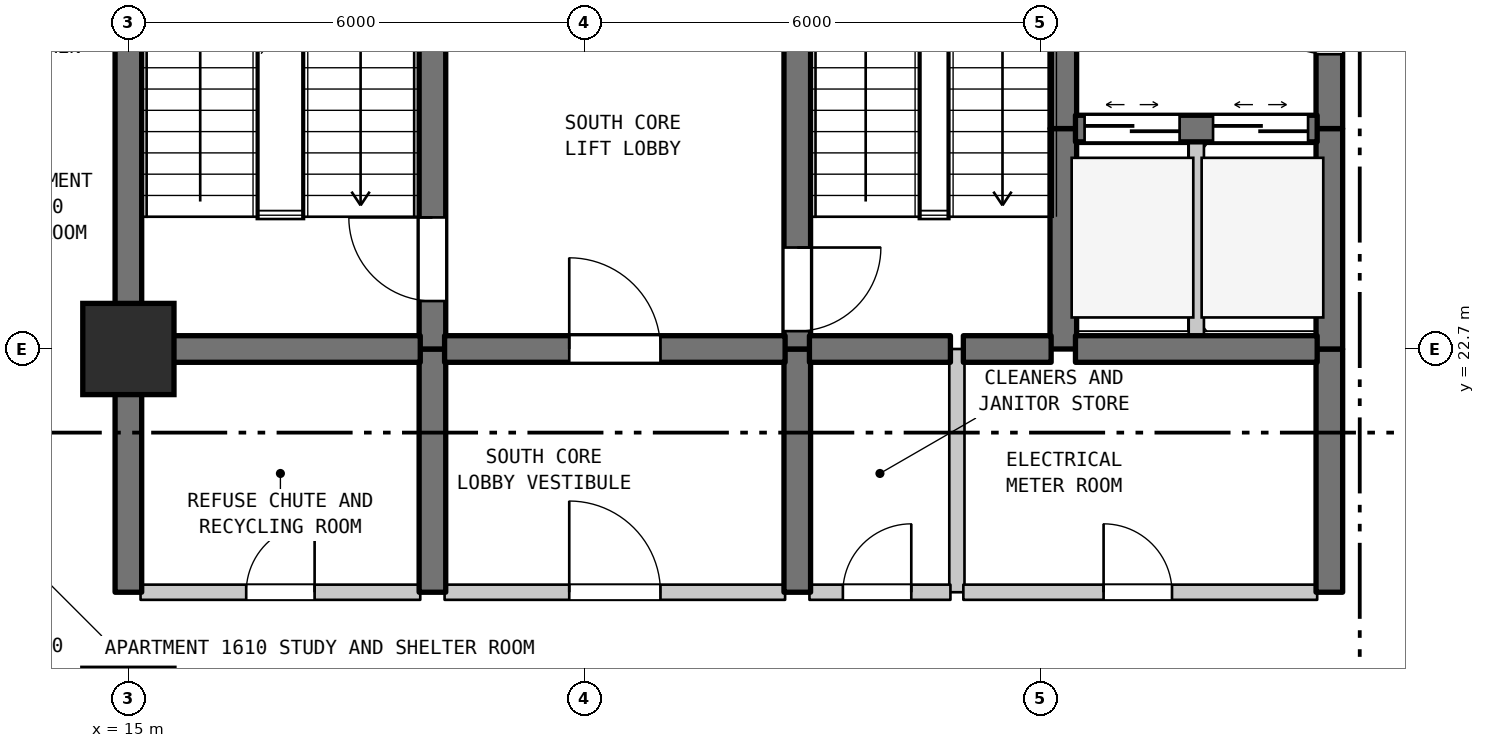
"""IFC4 building model, lengths in metres.
Left out: names, types, materials, properties, quantities, classifications, styles, units other than length and angle.
Written with IfcOpenShell. Run it as: python <this file> out.ifc"""

import sys

from ifc_helpers import new_model, si_unit, direction, frame, frame_2d, origin, origin_2d, place, context, subcontext, project, spatial, rectangle, extrude, element, fill, save


model = new_model("IFC4")
c1 = context("Model", 3, precision=1e-05, world=origin(), true_north=direction((0.0, 1.0)))
c2 = subcontext(c1, "Body", "Model", "MODEL_VIEW")
j1 = project(units=[si_unit("LENGTHUNIT", "METRE"), si_unit("PLANEANGLEUNIT", "RADIAN")], contexts=[c1])
p1 = place(None, origin())
s1 = spatial("IfcSite", under=j1, at=p1, CompositionType="ELEMENT")
p2 = place(p1, origin())
s2 = spatial("IfcBuilding", under=s1, at=p2, CompositionType="ELEMENT")
p3 = place(p2, frame((0.0, 0.0, 70.1)))
s3 = spatial("IfcBuildingStorey", under=s2, at=p3, CompositionType="ELEMENT", Elevation=70.1)
p4 = place(p3, frame((15.0, 22.7, 0.0), z_axis=(0.0, 0.0, 1.0), x_axis=(1.0, 0.0, 0.0)))
e1 = element("IfcColumn", 1, at=p4, inside=s3, PredefinedType="COLUMN", context=c2, shape_type="SweptSolid", body=[
    extrude(rectangle(XDim=1.2, YDim=1.2, at=origin_2d()), origin(), (0.0, 0.0, 1.0), 3.7),
])
p5 = place(p3, frame((15.0, 19.5, 0.0), z_axis=(0.0, 0.0, 1.0), x_axis=(0.0, 1.0, 0.0)))
e2 = element("IfcWall", 2, at=p5, inside=s3, PredefinedType="SHEAR", context=c2, shape_type="SweptSolid", body=[
    extrude(rectangle(XDim=3.2, YDim=0.35, at=frame_2d((1.6, 0.0))), origin(), (0.0, 0.0, 1.0), 3.385),
])
p6 = place(p3, frame((15.0, 22.7, 0.0), z_axis=(0.0, 0.0, 1.0), x_axis=(0.0, 1.0, 0.0)))
e3 = element("IfcWall", 3, at=p6, inside=s3, PredefinedType="SHEAR", context=c2, shape_type="SweptSolid", body=[
    extrude(rectangle(XDim=6.8, YDim=0.35, at=frame_2d((3.4, 0.0))), origin(), (0.0, 0.0, 1.0), 3.385),
])
p7 = place(p3, frame((19.0, 19.5, 0.0), z_axis=(0.0, 0.0, 1.0), x_axis=(0.0, 1.0, 0.0)))
e4 = element("IfcWall", 4, at=p7, inside=s3, PredefinedType="SHEAR", context=c2, shape_type="SweptSolid", body=[
    extrude(rectangle(XDim=3.2, YDim=0.35, at=frame_2d((1.6, 0.0))), origin(), (0.0, 0.0, 1.0), 3.385),
])
p8 = place(p3, frame((19.0, 22.7, 0.0), z_axis=(0.0, 0.0, 1.0), x_axis=(0.0, 1.0, 0.0)))
e5 = element("IfcWall", 5, at=p8, inside=s3, PredefinedType="SHEAR", context=c2, shape_type="SweptSolid", body=[
    extrude(rectangle(XDim=5.5, YDim=0.35, at=frame_2d((2.75, 0.0))), origin(), (0.0, 0.0, 1.0), 3.385),
])
p9 = place(p8, frame((0.631, 0.0, 0.0)))
e6 = element("IfcOpeningElement", 6, at=p9, cuts=e5, PredefinedType="OPENING", context=c2, shape_type="SweptSolid", body=[
    extrude(rectangle(XDim=1.1, YDim=2.15, at=frame_2d((0.55, 1.075))), frame((0.0, 0.185, 0.0), z_axis=(0.0, -1.0, 0.0), x_axis=(1.0, 0.0, 0.0)), (0.0, 0.0, 1.0), 0.37),
])
p10 = place(p3, frame((23.8, 19.5, 0.0), z_axis=(0.0, 0.0, 1.0), x_axis=(0.0, 1.0, 0.0)))
e7 = element("IfcWall", 7, at=p10, inside=s3, PredefinedType="SHEAR", context=c2, shape_type="SweptSolid", body=[
    extrude(rectangle(XDim=3.2, YDim=0.35, at=frame_2d((1.6, 0.0))), origin(), (0.0, 0.0, 1.0), 3.385),
])
p11 = place(p3, frame((23.8, 22.7, 0.0), z_axis=(0.0, 0.0, 1.0), x_axis=(0.0, 1.0, 0.0)))
e8 = element("IfcWall", 8, at=p11, inside=s3, PredefinedType="SHEAR", context=c2, shape_type="SweptSolid", body=[
    extrude(rectangle(XDim=5.5, YDim=0.35, at=frame_2d((2.75, 0.0))), origin(), (0.0, 0.0, 1.0), 3.385),
])
p12 = place(p11, frame((0.235, 0.0, 0.0)))
e9 = element("IfcOpeningElement", 9, at=p12, cuts=e8, PredefinedType="OPENING", context=c2, shape_type="SweptSolid", body=[
    extrude(rectangle(XDim=1.1, YDim=2.15, at=frame_2d((0.55, 1.075))), frame((0.0, 0.185, 0.0), z_axis=(0.0, -1.0, 0.0), x_axis=(1.0, 0.0, 0.0)), (0.0, 0.0, 1.0), 0.37),
])
p13 = place(p3, frame((25.9, 19.5, 0.0), z_axis=(0.0, 0.0, 1.0), x_axis=(0.0, 1.0, 0.0)))
e10 = element("IfcWall", 10, at=p13, inside=s3, PredefinedType="STANDARD", context=c2, shape_type="SweptSolid", body=[
    extrude(rectangle(XDim=3.2, YDim=0.2, at=frame_2d((1.6, 0.0))), origin(), (0.0, 0.0, 1.0), 3.385),
])
p14 = place(p3, frame((27.3, 22.7, 0.0), z_axis=(0.0, 0.0, 1.0), x_axis=(0.0, 1.0, 0.0)))
e11 = element("IfcWall", 11, at=p14, inside=s3, PredefinedType="SHEAR", context=c2, shape_type="SweptSolid", body=[
    extrude(rectangle(XDim=2.9, YDim=0.35, at=frame_2d((1.45, 0.0))), origin(), (0.0, 0.0, 1.0), 3.385),
])
p15 = place(p3, frame((27.3, 25.6, 0.0), z_axis=(0.0, 0.0, 1.0), x_axis=(0.0, 1.0, 0.0)))
e12 = element("IfcWall", 12, at=p15, inside=s3, PredefinedType="SHEAR", context=c2, shape_type="SweptSolid", body=[
    extrude(rectangle(XDim=3.3, YDim=0.35, at=frame_2d((1.65, 0.0))), origin(), (0.0, 0.0, 1.0), 3.385),
])
p16 = place(p3, frame((29.05, 22.7, 0.0), z_axis=(0.0, 0.0, 1.0), x_axis=(0.0, 1.0, 0.0)))
e13 = element("IfcWall", 13, at=p16, inside=s3, PredefinedType="STANDARD", context=c2, shape_type="SweptSolid", body=[
    extrude(rectangle(XDim=2.9, YDim=0.2, at=frame_2d((1.45, 0.0))), origin(), (0.0, 0.0, 1.0), 3.385),
])
p17 = place(p3, frame((30.8, 19.5, 0.0), z_axis=(0.0, 0.0, 1.0), x_axis=(0.0, 1.0, 0.0)))
e14 = element("IfcWall", 14, at=p17, inside=s3, PredefinedType="SHEAR", context=c2, shape_type="SweptSolid", body=[
    extrude(rectangle(XDim=3.2, YDim=0.35, at=frame_2d((1.6, 0.0))), origin(), (0.0, 0.0, 1.0), 3.385),
])
p18 = place(p3, frame((30.8, 22.7, 0.0), z_axis=(0.0, 0.0, 1.0), x_axis=(0.0, 1.0, 0.0)))
e15 = element("IfcWall", 15, at=p18, inside=s3, PredefinedType="SHEAR", context=c2, shape_type="SweptSolid", body=[
    extrude(rectangle(XDim=2.9, YDim=0.35, at=frame_2d((1.45, 0.0))), origin(), (0.0, 0.0, 1.0), 3.385),
])
p19 = place(p3, frame((30.8, 25.6, 0.0), z_axis=(0.0, 0.0, 1.0), x_axis=(0.0, 1.0, 0.0)))
e16 = element("IfcWall", 16, at=p19, inside=s3, PredefinedType="SHEAR", context=c2, shape_type="SweptSolid", body=[
    extrude(rectangle(XDim=3.3, YDim=0.35, at=frame_2d((1.65, 0.0))), origin(), (0.0, 0.0, 1.0), 3.385),
])
p20 = place(p19, frame((0.978, 0.0, 0.0)))
e17 = element("IfcOpeningElement", 17, at=p20, cuts=e16, PredefinedType="OPENING", context=c2, shape_type="SweptSolid", body=[
    extrude(rectangle(XDim=1.2, YDim=2.2, at=frame_2d((0.6, 1.1))), frame((0.0, 0.185, 0.0), z_axis=(0.0, -1.0, 0.0), x_axis=(1.0, 0.0, 0.0)), (0.0, 0.0, 1.0), 0.37),
])
p21 = place(p3, frame((15.16, 19.5, 0.0), z_axis=(0.0, 0.0, 1.0), x_axis=(1.0, 0.0, 0.0)))
e18 = element("IfcWall", 18, at=p21, inside=s3, PredefinedType="STANDARD", context=c2, shape_type="SweptSolid", body=[
    extrude(rectangle(XDim=3.68, YDim=0.2, at=frame_2d((1.84, 0.0))), origin(), (0.0, 0.0, 1.0), 3.385),
])
p22 = place(p21, frame((1.39, 0.0, 0.0)))
e19 = element("IfcOpeningElement", 19, at=p22, cuts=e18, PredefinedType="OPENING", context=c2, shape_type="SweptSolid", body=[
    extrude(rectangle(XDim=0.9, YDim=2.15, at=frame_2d((0.45, 1.075))), frame((0.0, 0.11, 0.0), z_axis=(0.0, -1.0, 0.0), x_axis=(1.0, 0.0, 0.0)), (0.0, 0.0, 1.0), 0.22),
])
p23 = place(p3, frame((19.16, 19.5, 0.0), z_axis=(0.0, 0.0, 1.0), x_axis=(1.0, 0.0, 0.0)))
e20 = element("IfcWall", 20, at=p23, inside=s3, PredefinedType="STANDARD", context=c2, shape_type="SweptSolid", body=[
    extrude(rectangle(XDim=4.48, YDim=0.2, at=frame_2d((2.24, 0.0))), origin(), (0.0, 0.0, 1.0), 3.385),
])
p24 = place(p23, frame((1.64, 0.0, 0.0)))
e21 = element("IfcOpeningElement", 21, at=p24, cuts=e20, PredefinedType="OPENING", context=c2, shape_type="SweptSolid", body=[
    extrude(rectangle(XDim=1.2, YDim=2.2, at=frame_2d((0.6, 1.1))), frame((0.0, 0.11, 0.0), z_axis=(0.0, -1.0, 0.0), x_axis=(1.0, 0.0, 0.0)), (0.0, 0.0, 1.0), 0.22),
])
p25 = place(p3, frame((23.96, 19.5, 0.0), z_axis=(0.0, 0.0, 1.0), x_axis=(1.0, 0.0, 0.0)))
e22 = element("IfcWall", 22, at=p25, inside=s3, PredefinedType="STANDARD", context=c2, shape_type="SweptSolid", body=[
    extrude(rectangle(XDim=1.855, YDim=0.2, at=frame_2d((0.927, 0.0))), origin(), (0.0, 0.0, 1.0), 3.385),
])
p26 = place(p25, frame((0.44, 0.0, 0.0)))
e23 = element("IfcOpeningElement", 23, at=p26, cuts=e22, PredefinedType="OPENING", context=c2, shape_type="SweptSolid", body=[
    extrude(rectangle(XDim=0.9, YDim=2.15, at=frame_2d((0.45, 1.075))), frame((0.0, 0.11, 0.0), z_axis=(0.0, -1.0, 0.0), x_axis=(1.0, 0.0, 0.0)), (0.0, 0.0, 1.0), 0.22),
])
p27 = place(p3, frame((25.985, 19.5, 0.0), z_axis=(0.0, 0.0, 1.0), x_axis=(1.0, 0.0, 0.0)))
e24 = element("IfcWall", 24, at=p27, inside=s3, PredefinedType="STANDARD", context=c2, shape_type="SweptSolid", body=[
    extrude(rectangle(XDim=4.655, YDim=0.2, at=frame_2d((2.327, 0.0))), origin(), (0.0, 0.0, 1.0), 3.385),
])
p28 = place(p27, frame((1.845, 0.0, 0.0)))
e25 = element("IfcOpeningElement", 25, at=p28, cuts=e24, PredefinedType="OPENING", context=c2, shape_type="SweptSolid", body=[
    extrude(rectangle(XDim=0.9, YDim=2.15, at=frame_2d((0.45, 1.075))), frame((0.0, 0.11, 0.0), z_axis=(0.0, -1.0, 0.0), x_axis=(1.0, 0.0, 0.0)), (0.0, 0.0, 1.0), 0.22),
])
p29 = place(p3, frame((15.16, 22.7, 0.0), z_axis=(0.0, 0.0, 1.0), x_axis=(1.0, 0.0, 0.0)))
e26 = element("IfcWall", 26, at=p29, inside=s3, PredefinedType="SHEAR", context=c2, shape_type="SweptSolid", body=[
    extrude(rectangle(XDim=3.68, YDim=0.35, at=frame_2d((1.84, 0.0))), origin(), (0.0, 0.0, 1.0), 3.385),
])
p30 = place(p3, frame((19.16, 22.7, 0.0), z_axis=(0.0, 0.0, 1.0), x_axis=(1.0, 0.0, 0.0)))
e27 = element("IfcWall", 27, at=p30, inside=s3, PredefinedType="SHEAR", context=c2, shape_type="SweptSolid", body=[
    extrude(rectangle(XDim=4.48, YDim=0.35, at=frame_2d((2.24, 0.0))), origin(), (0.0, 0.0, 1.0), 3.385),
])
p31 = place(p30, frame((1.64, 0.0, 0.0)))
e28 = element("IfcOpeningElement", 28, at=p31, cuts=e27, PredefinedType="OPENING", context=c2, shape_type="SweptSolid", body=[
    extrude(rectangle(XDim=1.2, YDim=2.2, at=frame_2d((0.6, 1.1))), frame((0.0, 0.185, 0.0), z_axis=(0.0, -1.0, 0.0), x_axis=(1.0, 0.0, 0.0)), (0.0, 0.0, 1.0), 0.37),
])
p32 = place(p3, frame((23.96, 22.7, 0.0), z_axis=(0.0, 0.0, 1.0), x_axis=(1.0, 0.0, 0.0)))
e29 = element("IfcWall", 29, at=p32, inside=s3, PredefinedType="SHEAR", context=c2, shape_type="SweptSolid", body=[
    extrude(rectangle(XDim=1.855, YDim=0.35, at=frame_2d((0.927, 0.0))), origin(), (0.0, 0.0, 1.0), 3.385),
])
p33 = place(p3, frame((25.985, 22.7, 0.0), z_axis=(0.0, 0.0, 1.0), x_axis=(1.0, 0.0, 0.0)))
e30 = element("IfcWall", 30, at=p33, inside=s3, PredefinedType="SHEAR", context=c2, shape_type="SweptSolid", body=[
    extrude(rectangle(XDim=1.155, YDim=0.35, at=frame_2d((0.577, 0.0))), origin(), (0.0, 0.0, 1.0), 3.385),
])
p34 = place(p3, frame((27.46, 22.7, 0.0), z_axis=(0.0, 0.0, 1.0), x_axis=(1.0, 0.0, 0.0)))
e31 = element("IfcWall", 31, at=p34, inside=s3, PredefinedType="SHEAR", context=c2, shape_type="SweptSolid", body=[
    extrude(rectangle(XDim=3.18, YDim=0.35, at=frame_2d((1.59, 0.0))), origin(), (0.0, 0.0, 1.0), 3.385),
])
p35 = place(p3, frame((27.46, 25.6, 0.0), z_axis=(0.0, 0.0, 1.0), x_axis=(1.0, 0.0, 0.0)))
e32 = element("IfcWall", 32, at=p35, inside=s3, PredefinedType="SHEAR", context=c2, shape_type="SweptSolid", body=[
    extrude(rectangle(XDim=3.18, YDim=0.35, at=frame_2d((1.59, 0.0))), origin(), (0.0, 0.0, 1.0), 3.385),
])
p36 = place(p35, frame((0.12, 0.0, 0.0)))
e33 = element("IfcOpeningElement", 33, at=p36, cuts=e32, PredefinedType="OPENING", context=c2, shape_type="SweptSolid", body=[
    extrude(rectangle(XDim=1.25, YDim=2.2, at=frame_2d((0.625, 1.1))), frame((0.0, 0.185, 0.0), z_axis=(0.0, -1.0, 0.0), x_axis=(1.0, 0.0, 0.0)), (0.0, 0.0, 1.0), 0.37),
])
p37 = place(p35, frame((1.81, 0.0, 0.0)))
e34 = element("IfcOpeningElement", 34, at=p37, cuts=e32, PredefinedType="OPENING", context=c2, shape_type="SweptSolid", body=[
    extrude(rectangle(XDim=1.25, YDim=2.2, at=frame_2d((0.625, 1.1))), frame((0.0, 0.185, 0.0), z_axis=(0.0, -1.0, 0.0), x_axis=(1.0, 0.0, 0.0)), (0.0, 0.0, 1.0), 0.37),
])
p38 = place(p9, origin())
e35 = element("IfcDoor", 35, at=p38, inside=s3, OperationType="SINGLE_SWING_RIGHT", PredefinedType="DOOR", context=c2, shape_type="SweptSolid", body=[
    extrude(rectangle(XDim=1.1, YDim=2.15, at=frame_2d((0.55, 1.075))), frame((0.0, 0.025, 0.0), z_axis=(0.0, -1.0, 0.0), x_axis=(1.0, 0.0, 0.0)), (0.0, 0.0, 1.0), 0.05),
])
fill(e6, e35)
p39 = place(p12, frame((1.1, 0.0, 0.0), z_axis=(0.0, 0.0, 1.0), x_axis=(-1.0, 0.0, 0.0)))
e36 = element("IfcDoor", 36, at=p39, inside=s3, OperationType="SINGLE_SWING_RIGHT", PredefinedType="DOOR", context=c2, shape_type="SweptSolid", body=[
    extrude(rectangle(XDim=1.1, YDim=2.15, at=frame_2d((0.55, 1.075))), frame((0.0, 0.025, 0.0), z_axis=(0.0, -1.0, 0.0), x_axis=(1.0, 0.0, 0.0)), (0.0, 0.0, 1.0), 0.05),
])
fill(e9, e36)
p40 = place(p20, origin())
e37 = element("IfcDoor", 37, at=p40, inside=s3, OperationType="SINGLE_SWING_RIGHT", PredefinedType="DOOR", context=c2, shape_type="SweptSolid", body=[
    extrude(rectangle(XDim=1.2, YDim=2.2, at=frame_2d((0.6, 1.1))), frame((0.0, 0.025, 0.0), z_axis=(0.0, -1.0, 0.0), x_axis=(1.0, 0.0, 0.0)), (0.0, 0.0, 1.0), 0.05),
])
fill(e17, e37)
p41 = place(p22, origin())
e38 = element("IfcDoor", 38, at=p41, inside=s3, OperationType="SINGLE_SWING_RIGHT", PredefinedType="DOOR", context=c2, shape_type="SweptSolid", body=[
    extrude(rectangle(XDim=0.9, YDim=2.15, at=frame_2d((0.45, 1.075))), frame((0.0, 0.025, 0.0), z_axis=(0.0, -1.0, 0.0), x_axis=(1.0, 0.0, 0.0)), (0.0, 0.0, 1.0), 0.05),
])
fill(e19, e38)
p42 = place(p24, origin())
e39 = element("IfcDoor", 39, at=p42, inside=s3, OperationType="SINGLE_SWING_LEFT", PredefinedType="DOOR", context=c2, shape_type="SweptSolid", body=[
    extrude(rectangle(XDim=1.2, YDim=2.2, at=frame_2d((0.6, 1.1))), frame((0.0, 0.025, 0.0), z_axis=(0.0, -1.0, 0.0), x_axis=(1.0, 0.0, 0.0)), (0.0, 0.0, 1.0), 0.05),
])
fill(e21, e39)
p43 = place(p26, origin())
e40 = element("IfcDoor", 40, at=p43, inside=s3, OperationType="SINGLE_SWING_RIGHT", PredefinedType="DOOR", context=c2, shape_type="SweptSolid", body=[
    extrude(rectangle(XDim=0.9, YDim=2.15, at=frame_2d((0.45, 1.075))), frame((0.0, 0.025, 0.0), z_axis=(0.0, -1.0, 0.0), x_axis=(1.0, 0.0, 0.0)), (0.0, 0.0, 1.0), 0.05),
])
fill(e23, e40)
p44 = place(p28, origin())
e41 = element("IfcDoor", 41, at=p44, inside=s3, OperationType="SINGLE_SWING_LEFT", PredefinedType="DOOR", context=c2, shape_type="SweptSolid", body=[
    extrude(rectangle(XDim=0.9, YDim=2.15, at=frame_2d((0.45, 1.075))), frame((0.0, 0.025, 0.0), z_axis=(0.0, -1.0, 0.0), x_axis=(1.0, 0.0, 0.0)), (0.0, 0.0, 1.0), 0.05),
])
fill(e25, e41)
p45 = place(p31, origin())
e42 = element("IfcDoor", 42, at=p45, inside=s3, OperationType="SINGLE_SWING_LEFT", PredefinedType="DOOR", context=c2, shape_type="SweptSolid", body=[
    extrude(rectangle(XDim=1.2, YDim=2.2, at=frame_2d((0.6, 1.1))), frame((0.0, 0.025, 0.0), z_axis=(0.0, -1.0, 0.0), x_axis=(1.0, 0.0, 0.0)), (0.0, 0.0, 1.0), 0.05),
])
fill(e28, e42)
p46 = place(p36, origin())
e43 = element("IfcDoor", 43, at=p46, inside=s3, OperationType="DOUBLE_DOOR_SLIDING", PredefinedType="DOOR", context=c2, shape_type="SweptSolid", body=[
    extrude(rectangle(XDim=1.25, YDim=2.2, at=frame_2d((0.625, 1.1))), frame((0.0, 0.025, 0.0), z_axis=(0.0, -1.0, 0.0), x_axis=(1.0, 0.0, 0.0)), (0.0, 0.0, 1.0), 0.05),
])
fill(e33, e43)
p47 = place(p37, origin())
e44 = element("IfcDoor", 44, at=p47, inside=s3, OperationType="DOUBLE_DOOR_SLIDING", PredefinedType="DOOR", context=c2, shape_type="SweptSolid", body=[
    extrude(rectangle(XDim=1.25, YDim=2.2, at=frame_2d((0.625, 1.1))), frame((0.0, 0.025, 0.0), z_axis=(0.0, -1.0, 0.0), x_axis=(1.0, 0.0, 0.0)), (0.0, 0.0, 1.0), 0.05),
])
fill(e34, e44)
save(model, sys.argv[1])
